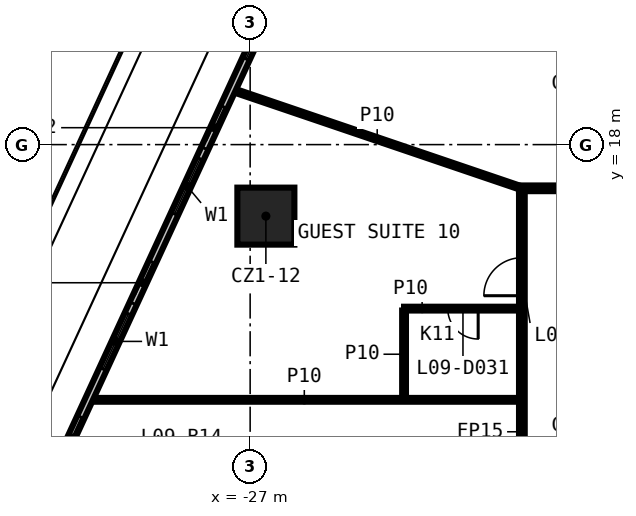
"""IFC4 building model, lengths in metres.
Left out: names, types, materials, properties, quantities, classifications, styles, units other than length and angle.
Written with IfcOpenShell. Run it as: python <this file> out.ifc"""

import sys

from ifc_helpers import new_model, si_unit, direction, frame, frame_2d, origin, origin_2d, place, context, subcontext, project, spatial, rectangle, extrude, element, fill, save


model = new_model("IFC4")
c1 = context("Model", 3, precision=1e-05, world=origin(), true_north=direction((0.0, 1.0)))
c2 = subcontext(c1, "Body", "Model", "MODEL_VIEW")
j1 = project(units=[si_unit("LENGTHUNIT", "METRE"), si_unit("PLANEANGLEUNIT", "RADIAN")], contexts=[c1])
p1 = place(None, origin())
s1 = spatial("IfcSite", under=j1, at=p1, CompositionType="ELEMENT")
p2 = place(p1, origin())
s2 = spatial("IfcBuilding", under=s1, at=p2, CompositionType="ELEMENT")
p3 = place(p2, frame((0.0, 0.0, 55.1)))
s3 = spatial("IfcBuildingStorey", under=s2, at=p3, CompositionType="ELEMENT", Elevation=55.1)
p4 = place(p3, frame((-26.586, 16.118, 0.0), z_axis=(0.0, 0.0, 1.0), x_axis=(1.0, 0.0, 0.0)))
e1 = element("IfcColumn", 1, at=p4, inside=s3, PredefinedType="COLUMN", context=c2, shape_type="SweptSolid", body=[
    extrude(rectangle(XDim=1.5, YDim=1.5, at=origin_2d()), origin(), (0.0, 0.0, 1.0), 3.3),
])
p5 = place(p3, frame((-31.225, 11.284, 0.0), z_axis=(0.0, 0.0, 1.0), x_axis=(1.0, 0.0, 0.0)))
e2 = element("IfcWall", 2, at=p5, inside=s3, PredefinedType="PARTITIONING", context=c2, shape_type="SweptSolid", body=[
    extrude(rectangle(XDim=11.3, YDim=0.1, at=frame_2d((5.65, 0.0))), origin(), (0.0, 0.0, 1.0), 3.3),
])
p6 = place(p3, frame((-19.925, 13.684, 0.0), z_axis=(0.0, 0.0, 1.0), x_axis=(-1.0, 0.0, 0.0)))
e3 = element("IfcWall", 3, at=p6, inside=s3, PredefinedType="PARTITIONING", context=c2, shape_type="SweptSolid", body=[
    extrude(rectangle(XDim=3.025, YDim=0.1, at=frame_2d((1.512, 0.0))), origin(), (0.0, 0.0, 1.0), 3.3),
])
p7 = place(p6, frame((1.075, 0.0, 0.0)))
e4 = element("IfcOpeningElement", 4, at=p7, cuts=e3, PredefinedType="OPENING", context=c2, shape_type="SweptSolid", body=[
    extrude(rectangle(XDim=0.8, YDim=2.1, at=frame_2d((0.4, 1.05))), frame((0.0, 0.06, 0.0), z_axis=(0.0, -1.0, 0.0), x_axis=(1.0, 0.0, 0.0)), (0.0, 0.0, 1.0), 0.12),
])
p8 = place(p3, frame((-19.925, 16.85, 0.0), z_axis=(0.0, 0.0, 1.0), x_axis=(1.0, 0.0, 0.0)))
e5 = element("IfcWall", 5, at=p8, inside=s3, PredefinedType="PARTITIONING", context=c2, shape_type="SweptSolid", body=[
    extrude(rectangle(XDim=39.85, YDim=0.15, at=frame_2d((19.925, 0.0))), origin(), (0.0, 0.0, 1.0), 3.3),
])
p9 = place(p8, frame((31.433, 0.0, 0.0)))
e6 = element("IfcOpeningElement", 6, at=p9, cuts=e5, PredefinedType="OPENING", context=c2, shape_type="SweptSolid", body=[
    extrude(rectangle(XDim=0.9, YDim=2.1, at=frame_2d((0.45, 1.05))), frame((0.0, 0.085, 0.0), z_axis=(0.0, -1.0, 0.0), x_axis=(1.0, 0.0, 0.0)), (0.0, 0.0, 1.0), 0.17),
])
p10 = place(p8, frame((22.043, 0.0, 0.0)))
e7 = element("IfcOpeningElement", 7, at=p10, cuts=e5, PredefinedType="OPENING", context=c2, shape_type="SweptSolid", body=[
    extrude(rectangle(XDim=0.9, YDim=2.1, at=frame_2d((0.45, 1.05))), frame((0.0, 0.085, 0.0), z_axis=(0.0, -1.0, 0.0), x_axis=(1.0, 0.0, 0.0)), (0.0, 0.0, 1.0), 0.17),
])
p11 = place(p8, frame((16.957, 0.0, 0.0)))
e8 = element("IfcOpeningElement", 8, at=p11, cuts=e5, PredefinedType="OPENING", context=c2, shape_type="SweptSolid", body=[
    extrude(rectangle(XDim=0.9, YDim=2.1, at=frame_2d((0.45, 1.05))), frame((0.0, 0.085, 0.0), z_axis=(0.0, -1.0, 0.0), x_axis=(1.0, 0.0, 0.0)), (0.0, 0.0, 1.0), 0.17),
])
p12 = place(p8, frame((13.572, 0.0, 0.0)))
e9 = element("IfcOpeningElement", 9, at=p12, cuts=e5, PredefinedType="OPENING", context=c2, shape_type="SweptSolid", body=[
    extrude(rectangle(XDim=0.9, YDim=2.1, at=frame_2d((0.45, 1.05))), frame((0.0, 0.085, 0.0), z_axis=(0.0, -1.0, 0.0), x_axis=(1.0, 0.0, 0.0)), (0.0, 0.0, 1.0), 0.17),
])
p13 = place(p8, frame((7.458, 0.0, 0.0)))
e10 = element("IfcOpeningElement", 10, at=p13, cuts=e5, PredefinedType="OPENING", context=c2, shape_type="SweptSolid", body=[
    extrude(rectangle(XDim=1.0, YDim=2.1, at=frame_2d((0.5, 1.05))), frame((0.0, 0.085, 0.0), z_axis=(0.0, -1.0, 0.0), x_axis=(1.0, 0.0, 0.0)), (0.0, 0.0, 1.0), 0.17),
])
p14 = place(p3, frame((-19.85, -16.775, 0.0), z_axis=(0.0, 0.0, 1.0), x_axis=(0.0, 1.0, 0.0)))
e11 = element("IfcWall", 11, at=p14, inside=s3, PredefinedType="PARTITIONING", context=c2, shape_type="SweptSolid", body=[
    extrude(rectangle(XDim=33.55, YDim=0.15, at=frame_2d((16.775, 0.0))), origin(), (0.0, 0.0, 1.0), 3.3),
])
p15 = place(p14, frame((12.083, 0.0, 0.0)))
e12 = element("IfcOpeningElement", 12, at=p15, cuts=e11, PredefinedType="OPENING", context=c2, shape_type="SweptSolid", body=[
    extrude(rectangle(XDim=1.0, YDim=2.1, at=frame_2d((0.5, 1.05))), frame((0.0, 0.085, 0.0), z_axis=(0.0, -1.0, 0.0), x_axis=(1.0, 0.0, 0.0)), (0.0, 0.0, 1.0), 0.17),
])
p16 = place(p14, frame((10.128, 0.0, 0.0)))
e13 = element("IfcOpeningElement", 13, at=p16, cuts=e11, PredefinedType="OPENING", context=c2, shape_type="SweptSolid", body=[
    extrude(rectangle(XDim=1.0, YDim=2.1, at=frame_2d((0.5, 1.05))), frame((0.0, 0.085, 0.0), z_axis=(0.0, -1.0, 0.0), x_axis=(1.0, 0.0, 0.0)), (0.0, 0.0, 1.0), 0.17),
])
p17 = place(p14, frame((3.259, 0.0, 0.0)))
e14 = element("IfcOpeningElement", 14, at=p17, cuts=e11, PredefinedType="OPENING", context=c2, shape_type="SweptSolid", body=[
    extrude(rectangle(XDim=0.9, YDim=2.1, at=frame_2d((0.45, 1.05))), frame((0.0, 0.085, 0.0), z_axis=(0.0, -1.0, 0.0), x_axis=(1.0, 0.0, 0.0)), (0.0, 0.0, 1.0), 0.17),
])
p18 = place(p14, frame((30.799, 0.0, 0.0)))
e15 = element("IfcOpeningElement", 15, at=p18, cuts=e11, PredefinedType="OPENING", context=c2, shape_type="SweptSolid", body=[
    extrude(rectangle(XDim=1.0, YDim=2.1, at=frame_2d((0.5, 1.05))), frame((0.0, 0.085, 0.0), z_axis=(0.0, -1.0, 0.0), x_axis=(1.0, 0.0, 0.0)), (0.0, 0.0, 1.0), 0.17),
])
p19 = place(p14, frame((22.638, 0.0, 0.0)))
e16 = element("IfcOpeningElement", 16, at=p19, cuts=e11, PredefinedType="OPENING", context=c2, shape_type="SweptSolid", body=[
    extrude(rectangle(XDim=1.0, YDim=2.1, at=frame_2d((0.5, 1.05))), frame((0.0, 0.085, 0.0), z_axis=(0.0, -1.0, 0.0), x_axis=(1.0, 0.0, 0.0)), (0.0, 0.0, 1.0), 0.17),
])
p20 = place(p14, frame((18.681, 0.0, 0.0)))
e17 = element("IfcOpeningElement", 17, at=p20, cuts=e11, PredefinedType="OPENING", context=c2, shape_type="SweptSolid", body=[
    extrude(rectangle(XDim=0.9, YDim=2.1, at=frame_2d((0.45, 1.05))), frame((0.0, 0.085, 0.0), z_axis=(0.0, -1.0, 0.0), x_axis=(1.0, 0.0, 0.0)), (0.0, 0.0, 1.0), 0.17),
])
p21 = place(p3, frame((-22.95, 11.334, 0.0), z_axis=(0.0, 0.0, 1.0), x_axis=(0.0, 1.0, 0.0)))
e18 = element("IfcWall", 18, at=p21, inside=s3, PredefinedType="PARTITIONING", context=c2, shape_type="SweptSolid", body=[
    extrude(rectangle(XDim=2.3, YDim=0.1, at=frame_2d((1.15, 0.0))), origin(), (0.0, 0.0, 1.0), 3.3),
])
p22 = place(p3, frame((-27.464, 19.438, 0.0), z_axis=(0.0, 0.0, 1.0), x_axis=(0.946811969778, -0.321787342643, 0.0)))
e19 = element("IfcWall", 19, at=p22, inside=s3, PredefinedType="PARTITIONING", context=c2, shape_type="SweptSolid", body=[
    extrude(rectangle(XDim=8.042, YDim=0.1, at=frame_2d((4.021, 0.0))), origin(), (0.0, 0.0, 1.0), 3.3),
])
p23 = place(p3, frame((-25.601, 23.524, 0.0), z_axis=(0.0, 0.0, 1.0), x_axis=(-0.418809499218, -0.908074117771, 0.0)))
e20 = element("IfcWall", 20, at=p23, inside=s3, PredefinedType="SOLIDWALL", context=c2, shape_type="SweptSolid", body=[
    extrude(rectangle(XDim=26.959, YDim=0.2, at=frame_2d((13.479, 0.0))), origin(), (0.0, 0.0, 1.0), 3.3),
])
p24 = place(p23, frame((2.0, 0.0, 0.6)))
e21 = element("IfcOpeningElement", 21, at=p24, cuts=e20, PredefinedType="OPENING", context=c2, shape_type="SweptSolid", body=[
    extrude(rectangle(XDim=1.6, YDim=2.4, at=frame_2d((0.8, 1.2))), frame((0.0, 0.11, 0.0), z_axis=(0.0, -1.0, 0.0), x_axis=(1.0, 0.0, 0.0)), (0.0, 0.0, 1.0), 0.22),
])
p25 = place(p23, frame((0.5, 0.0, 0.0)))
e22 = element("IfcOpeningElement", 22, at=p25, cuts=e20, PredefinedType="OPENING", context=c2, shape_type="SweptSolid", body=[
    extrude(rectangle(XDim=1.2, YDim=2.4, at=frame_2d((0.6, 1.2))), frame((0.0, 0.11, 0.0), z_axis=(0.0, -1.0, 0.0), x_axis=(1.0, 0.0, 0.0)), (0.0, 0.0, 1.0), 0.22),
])
p26 = place(p23, frame((6.493, 0.0, 0.6)))
e23 = element("IfcOpeningElement", 23, at=p26, cuts=e20, PredefinedType="OPENING", context=c2, shape_type="SweptSolid", body=[
    extrude(rectangle(XDim=1.6, YDim=2.4, at=frame_2d((0.8, 1.2))), frame((0.0, 0.11, 0.0), z_axis=(0.0, -1.0, 0.0), x_axis=(1.0, 0.0, 0.0)), (0.0, 0.0, 1.0), 0.22),
])
p27 = place(p23, frame((4.993, 0.0, 0.0)))
e24 = element("IfcOpeningElement", 24, at=p27, cuts=e20, PredefinedType="OPENING", context=c2, shape_type="SweptSolid", body=[
    extrude(rectangle(XDim=1.2, YDim=2.4, at=frame_2d((0.6, 1.2))), frame((0.0, 0.11, 0.0), z_axis=(0.0, -1.0, 0.0), x_axis=(1.0, 0.0, 0.0)), (0.0, 0.0, 1.0), 0.22),
])
p28 = place(p23, frame((10.987, 0.0, 0.6)))
e25 = element("IfcOpeningElement", 25, at=p28, cuts=e20, PredefinedType="OPENING", context=c2, shape_type="SweptSolid", body=[
    extrude(rectangle(XDim=1.6, YDim=2.4, at=frame_2d((0.8, 1.2))), frame((0.0, 0.11, 0.0), z_axis=(0.0, -1.0, 0.0), x_axis=(1.0, 0.0, 0.0)), (0.0, 0.0, 1.0), 0.22),
])
p29 = place(p23, frame((9.487, 0.0, 0.0)))
e26 = element("IfcOpeningElement", 26, at=p29, cuts=e20, PredefinedType="OPENING", context=c2, shape_type="SweptSolid", body=[
    extrude(rectangle(XDim=1.2, YDim=2.4, at=frame_2d((0.6, 1.2))), frame((0.0, 0.11, 0.0), z_axis=(0.0, -1.0, 0.0), x_axis=(1.0, 0.0, 0.0)), (0.0, 0.0, 1.0), 0.22),
])
p30 = place(p23, frame((15.48, 0.0, 0.6)))
e27 = element("IfcOpeningElement", 27, at=p30, cuts=e20, PredefinedType="OPENING", context=c2, shape_type="SweptSolid", body=[
    extrude(rectangle(XDim=1.6, YDim=2.4, at=frame_2d((0.8, 1.2))), frame((0.0, 0.11, 0.0), z_axis=(0.0, -1.0, 0.0), x_axis=(1.0, 0.0, 0.0)), (0.0, 0.0, 1.0), 0.22),
])
p31 = place(p23, frame((13.98, 0.0, 0.0)))
e28 = element("IfcOpeningElement", 28, at=p31, cuts=e20, PredefinedType="OPENING", context=c2, shape_type="SweptSolid", body=[
    extrude(rectangle(XDim=1.2, YDim=2.4, at=frame_2d((0.6, 1.2))), frame((0.0, 0.11, 0.0), z_axis=(0.0, -1.0, 0.0), x_axis=(1.0, 0.0, 0.0)), (0.0, 0.0, 1.0), 0.22),
])
p32 = place(p23, frame((19.973, 0.0, 0.6)))
e29 = element("IfcOpeningElement", 29, at=p32, cuts=e20, PredefinedType="OPENING", context=c2, shape_type="SweptSolid", body=[
    extrude(rectangle(XDim=1.6, YDim=2.4, at=frame_2d((0.8, 1.2))), frame((0.0, 0.11, 0.0), z_axis=(0.0, -1.0, 0.0), x_axis=(1.0, 0.0, 0.0)), (0.0, 0.0, 1.0), 0.22),
])
p33 = place(p23, frame((18.473, 0.0, 0.0)))
e30 = element("IfcOpeningElement", 30, at=p33, cuts=e20, PredefinedType="OPENING", context=c2, shape_type="SweptSolid", body=[
    extrude(rectangle(XDim=1.2, YDim=2.4, at=frame_2d((0.6, 1.2))), frame((0.0, 0.11, 0.0), z_axis=(0.0, -1.0, 0.0), x_axis=(1.0, 0.0, 0.0)), (0.0, 0.0, 1.0), 0.22),
])
p34 = place(p23, frame((24.466, 0.0, 0.6)))
e31 = element("IfcOpeningElement", 31, at=p34, cuts=e20, PredefinedType="OPENING", context=c2, shape_type="SweptSolid", body=[
    extrude(rectangle(XDim=1.6, YDim=2.4, at=frame_2d((0.8, 1.2))), frame((0.0, 0.11, 0.0), z_axis=(0.0, -1.0, 0.0), x_axis=(1.0, 0.0, 0.0)), (0.0, 0.0, 1.0), 0.22),
])
p35 = place(p23, frame((22.966, 0.0, 0.0)))
e32 = element("IfcOpeningElement", 32, at=p35, cuts=e20, PredefinedType="OPENING", context=c2, shape_type="SweptSolid", body=[
    extrude(rectangle(XDim=1.2, YDim=2.4, at=frame_2d((0.6, 1.2))), frame((0.0, 0.11, 0.0), z_axis=(0.0, -1.0, 0.0), x_axis=(1.0, 0.0, 0.0)), (0.0, 0.0, 1.0), 0.22),
])
p36 = place(p7, origin())
e33 = element("IfcDoor", 33, at=p36, inside=s3, OperationType="SINGLE_SWING_RIGHT", PredefinedType="DOOR", context=c2, shape_type="SweptSolid", body=[
    extrude(rectangle(XDim=0.8, YDim=2.1, at=frame_2d((0.4, 1.05))), frame((0.0, 0.025, 0.0), z_axis=(0.0, -1.0, 0.0), x_axis=(1.0, 0.0, 0.0)), (0.0, 0.0, 1.0), 0.05),
])
fill(e4, e33)
p37 = place(p18, origin())
e34 = element("IfcDoor", 34, at=p37, inside=s3, OperationType="SINGLE_SWING_LEFT", PredefinedType="DOOR", context=c2, shape_type="SweptSolid", body=[
    extrude(rectangle(XDim=1.0, YDim=2.1, at=frame_2d((0.5, 1.05))), frame((0.0, 0.025, 0.0), z_axis=(0.0, -1.0, 0.0), x_axis=(1.0, 0.0, 0.0)), (0.0, 0.0, 1.0), 0.05),
])
fill(e15, e34)
p38 = place(p24, origin())
e35 = element("IfcWindow", 35, at=p38, inside=s3, PartitioningType="SINGLE_PANEL", PredefinedType="WINDOW", context=c2, shape_type="SweptSolid", body=[
    extrude(rectangle(XDim=1.6, YDim=2.4, at=frame_2d((0.8, 1.2))), frame((0.0, 0.03, 0.0), z_axis=(0.0, -1.0, 0.0), x_axis=(1.0, 0.0, 0.0)), (0.0, 0.0, 1.0), 0.06),
])
fill(e21, e35)
p39 = place(p26, origin())
e36 = element("IfcWindow", 36, at=p39, inside=s3, PartitioningType="SINGLE_PANEL", PredefinedType="WINDOW", context=c2, shape_type="SweptSolid", body=[
    extrude(rectangle(XDim=1.6, YDim=2.4, at=frame_2d((0.8, 1.2))), frame((0.0, 0.03, 0.0), z_axis=(0.0, -1.0, 0.0), x_axis=(1.0, 0.0, 0.0)), (0.0, 0.0, 1.0), 0.06),
])
fill(e23, e36)
p40 = place(p27, origin())
e37 = element("IfcDoor", 37, at=p40, inside=s3, OperationType="SLIDING_TO_LEFT", PredefinedType="DOOR", context=c2, shape_type="SweptSolid", body=[
    extrude(rectangle(XDim=1.2, YDim=2.4, at=frame_2d((0.6, 1.2))), frame((0.0, 0.025, 0.0), z_axis=(0.0, -1.0, 0.0), x_axis=(1.0, 0.0, 0.0)), (0.0, 0.0, 1.0), 0.05),
])
fill(e24, e37)
p41 = place(p28, origin())
e38 = element("IfcWindow", 38, at=p41, inside=s3, PartitioningType="SINGLE_PANEL", PredefinedType="WINDOW", context=c2, shape_type="SweptSolid", body=[
    extrude(rectangle(XDim=1.6, YDim=2.4, at=frame_2d((0.8, 1.2))), frame((0.0, 0.03, 0.0), z_axis=(0.0, -1.0, 0.0), x_axis=(1.0, 0.0, 0.0)), (0.0, 0.0, 1.0), 0.06),
])
fill(e25, e38)
p42 = place(p29, origin())
e39 = element("IfcDoor", 39, at=p42, inside=s3, OperationType="SLIDING_TO_LEFT", PredefinedType="DOOR", context=c2, shape_type="SweptSolid", body=[
    extrude(rectangle(XDim=1.2, YDim=2.4, at=frame_2d((0.6, 1.2))), frame((0.0, 0.025, 0.0), z_axis=(0.0, -1.0, 0.0), x_axis=(1.0, 0.0, 0.0)), (0.0, 0.0, 1.0), 0.05),
])
fill(e26, e39)
p43 = place(p31, origin())
e40 = element("IfcDoor", 40, at=p43, inside=s3, OperationType="SLIDING_TO_LEFT", PredefinedType="DOOR", context=c2, shape_type="SweptSolid", body=[
    extrude(rectangle(XDim=1.2, YDim=2.4, at=frame_2d((0.6, 1.2))), frame((0.0, 0.025, 0.0), z_axis=(0.0, -1.0, 0.0), x_axis=(1.0, 0.0, 0.0)), (0.0, 0.0, 1.0), 0.05),
])
fill(e28, e40)
save(model, sys.argv[1])
